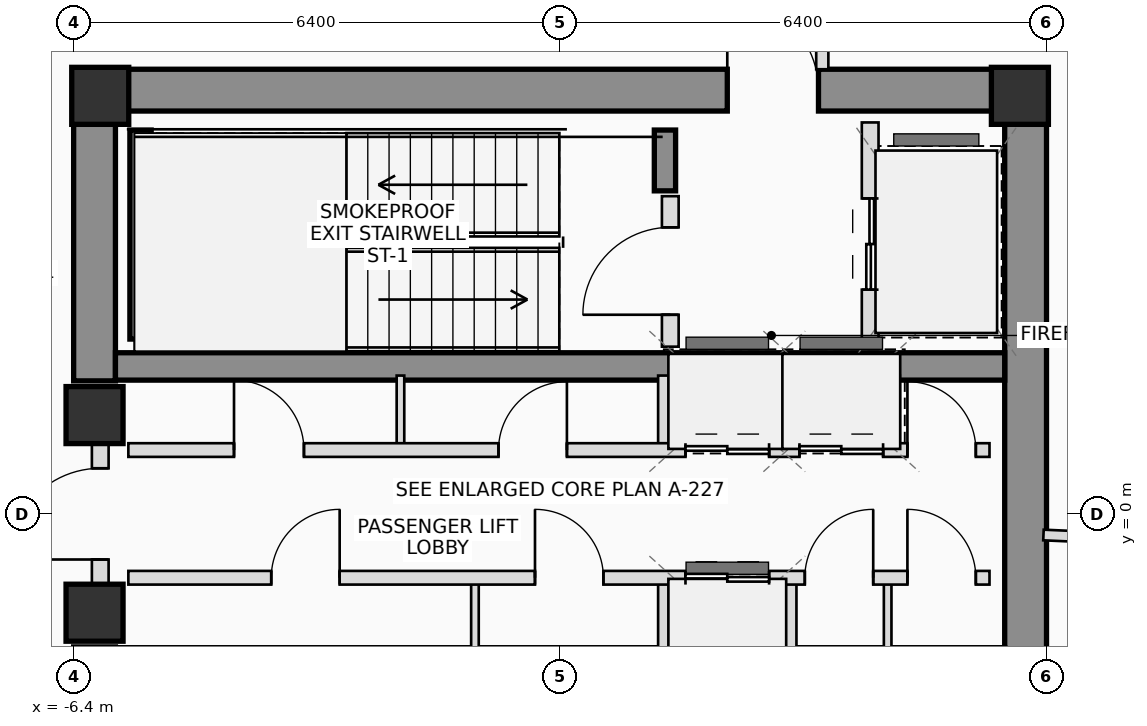
"""IFC4 building model, lengths in metres.
Left out: names, types, materials, properties, quantities, classifications, styles, units other than length and angle.
Written with IfcOpenShell. Run it as: python <this file> out.ifc"""

import sys

from ifc_helpers import new_model, si_unit, direction, frame, frame_2d, origin, origin_2d, place, context, subcontext, project, spatial, rectangle, extrude, source, transform, mapped, element, fill, save


model = new_model("IFC4")
c1 = context("Model", 3, precision=1e-05, world=origin(), true_north=direction((0.0, 1.0)))
c2 = subcontext(c1, "Body", "Model", "MODEL_VIEW")
j1 = project(units=[si_unit("LENGTHUNIT", "METRE"), si_unit("PLANEANGLEUNIT", "RADIAN")], contexts=[c1])
p1 = place(None, origin())
s1 = spatial("IfcSite", under=j1, at=p1, CompositionType="ELEMENT")
p2 = place(p1, origin())
s2 = spatial("IfcBuilding", under=s1, at=p2, CompositionType="ELEMENT")
p3 = place(p2, frame((0.0, 0.0, 293.3)))
s3 = spatial("IfcBuildingStorey", under=s2, at=p3, CompositionType="ELEMENT", Elevation=293.3)
m1 = source(origin(), c2, "Body", "SweptSolid", [
    extrude(rectangle(XDim=0.75, YDim=0.75, at=origin_2d()), origin(), (0.0, 0.0, 1.0), 3.45),
])
for number, where, z_axis, x_axis in (
    (1, (6.05, 5.5, 0.0), (0.0, 0.0, 1.0), (1.0, 0.0, 0.0)),
    (2, (-6.05, 5.5, 0.0), (0.0, 0.0, 1.0), (1.0, 0.0, 0.0)),
):
    element("IfcColumn", number, at=place(p3, frame(where, z_axis=z_axis, x_axis=x_axis)), inside=s3, PredefinedType="COLUMN", context=c2, shape_type="MappedRepresentation", body=[
        mapped(m1, transform((0.0, 0.0, 0.0), scale=1.0)),
    ])
p4 = place(p3, frame((-6.4, 5.575, 0.0), z_axis=(0.0, 0.0, 1.0), x_axis=(1.0, 0.0, 0.0)))
e3 = element("IfcWall", 3, at=p4, inside=s3, PredefinedType="SHEAR", context=c2, shape_type="SweptSolid", body=[
    extrude(rectangle(XDim=12.8, YDim=0.55, at=frame_2d((6.4, 0.0))), origin(), (0.0, 0.0, 1.0), 3.45),
])
p5 = place(p4, frame((8.6, 0.0, 0.0)))
e4 = element("IfcOpeningElement", 4, at=p5, cuts=e3, PredefinedType="OPENING", context=c2, shape_type="SweptSolid", body=[
    extrude(rectangle(XDim=1.2, YDim=2.2, at=frame_2d((0.6, 1.1))), frame((0.0, 0.285, 0.0), z_axis=(0.0, -1.0, 0.0), x_axis=(1.0, 0.0, 0.0)), (0.0, 0.0, 1.0), 0.57),
])
p6 = place(p3, frame((6.125, -5.3, 0.0), z_axis=(0.0, 0.0, 1.0), x_axis=(0.0, 1.0, 0.0)))
e5 = element("IfcWall", 5, at=p6, inside=s3, PredefinedType="SHEAR", context=c2, shape_type="SweptSolid", body=[
    extrude(rectangle(XDim=10.6, YDim=0.55, at=frame_2d((5.3, 0.0))), origin(), (0.0, 0.0, 1.0), 3.45),
])
p7 = place(p3, frame((-6.125, 1.75, 0.0), z_axis=(0.0, 0.0, 1.0), x_axis=(0.0, 1.0, 0.0)))
e6 = element("IfcWall", 6, at=p7, inside=s3, PredefinedType="SHEAR", context=c2, shape_type="SweptSolid", body=[
    extrude(rectangle(XDim=3.55, YDim=0.55, at=frame_2d((1.775, 0.0))), origin(), (0.0, 0.0, 1.0), 3.45),
])
p8 = place(p3, frame((-5.85, 1.94, 0.0), z_axis=(0.0, 0.0, 1.0), x_axis=(1.0, 0.0, 0.0)))
e7 = element("IfcWall", 7, at=p8, inside=s3, PredefinedType="SHEAR", context=c2, shape_type="SweptSolid", body=[
    extrude(rectangle(XDim=11.7, YDim=0.36, at=frame_2d((5.85, 0.0))), origin(), (0.0, 0.0, 1.0), 3.45),
])
p9 = place(p3, frame((-5.52, 2.3, 0.0), z_axis=(0.0, 0.0, 1.0), x_axis=(0.0, 1.0, 0.0)))
e8 = element("IfcWall", 8, at=p9, inside=s3, PredefinedType="SHEAR", context=c2, shape_type="SweptSolid", body=[
    extrude(rectangle(XDim=2.75, YDim=0.28, at=frame_2d((1.375, 0.0))), origin(), (0.0, 0.0, 1.0), 3.45),
])
p10 = place(p3, frame((1.38, 4.25, 0.0), z_axis=(0.0, 0.0, 1.0), x_axis=(0.0, 1.0, 0.0)))
e9 = element("IfcWall", 9, at=p10, inside=s3, PredefinedType="SHEAR", context=c2, shape_type="SweptSolid", body=[
    extrude(rectangle(XDim=0.8, YDim=0.28, at=frame_2d((0.4, 0.0))), origin(), (0.0, 0.0, 1.0), 3.45),
])
for number, where, z_axis, x_axis in (
    (10, (-6.125, -1.3, 0.0), (0.0, 0.0, 1.0), (1.0, 0.0, 0.0)),
    (11, (-6.125, 1.3, 0.0), (0.0, 0.0, 1.0), (1.0, 0.0, 0.0)),
):
    element("IfcColumn", number, at=place(p3, frame(where, z_axis=z_axis, x_axis=x_axis)), inside=s3, PredefinedType="COLUMN", context=c2, shape_type="MappedRepresentation", body=[
        mapped(m1, transform((0.0, 0.0, 0.0), scale=1.0)),
    ])
p11 = place(p3, frame((-6.05, -0.95, 0.0), z_axis=(0.0, 0.0, 1.0), x_axis=(0.0, 1.0, 0.0)))
e12 = element("IfcWall", 12, at=p11, inside=s3, PredefinedType="PLUMBINGWALL", context=c2, shape_type="SweptSolid", body=[
    extrude(rectangle(XDim=1.9, YDim=0.22, at=frame_2d((0.95, 0.0))), origin(), (0.0, 0.0, 1.0), 2.23),
])
p12 = place(p11, frame((0.35, 0.0, 0.0)))
e13 = element("IfcOpeningElement", 13, at=p12, cuts=e12, PredefinedType="OPENING", context=c2, shape_type="SweptSolid", body=[
    extrude(rectangle(XDim=1.2, YDim=2.2, at=frame_2d((0.6, 1.1))), frame((0.0, 0.12, 0.0), z_axis=(0.0, -1.0, 0.0), x_axis=(1.0, 0.0, 0.0)), (0.0, 0.0, 1.0), 0.24),
])
p13 = place(p3, frame((1.45, 2.2, 0.0), z_axis=(0.0, 0.0, 1.0), x_axis=(0.0, 1.0, 0.0)))
e14 = element("IfcWall", 14, at=p13, inside=s3, PredefinedType="PLUMBINGWALL", context=c2, shape_type="SweptSolid", body=[
    extrude(rectangle(XDim=1.98, YDim=0.22, at=frame_2d((0.99, 0.0))), origin(), (0.0, 0.0, 1.0), 3.25),
])
p14 = place(p13, frame((0.42, 0.0, 0.0)))
e15 = element("IfcOpeningElement", 15, at=p14, cuts=e14, PredefinedType="OPENING", context=c2, shape_type="SweptSolid", body=[
    extrude(rectangle(XDim=1.15, YDim=2.15, at=frame_2d((0.575, 1.075))), frame((0.0, 0.12, 0.0), z_axis=(0.0, -1.0, 0.0), x_axis=(1.0, 0.0, 0.0)), (0.0, 0.0, 1.0), 0.24),
])
p15 = place(p3, frame((4.08, 2.2, 0.0), z_axis=(0.0, 0.0, 1.0), x_axis=(0.0, 1.0, 0.0)))
e16 = element("IfcWall", 16, at=p15, inside=s3, PredefinedType="PLUMBINGWALL", context=c2, shape_type="SweptSolid", body=[
    extrude(rectangle(XDim=2.95, YDim=0.22, at=frame_2d((1.475, 0.0))), origin(), (0.0, 0.0, 1.0), 3.25),
])
p16 = place(p15, frame((0.75, 0.0, 0.0)))
e17 = element("IfcOpeningElement", 17, at=p16, cuts=e16, PredefinedType="OPENING", context=c2, shape_type="SweptSolid", body=[
    extrude(rectangle(XDim=1.2, YDim=2.25, at=frame_2d((0.6, 1.125))), frame((0.0, 0.12, 0.0), z_axis=(0.0, -1.0, 0.0), x_axis=(1.0, 0.0, 0.0)), (0.0, 0.0, 1.0), 0.24),
])
for number, where, z_axis, x_axis in (
    (18, (-2.1, 0.84, 0.0), (0.0, 0.0, 1.0), (0.0, 1.0, 0.0)),
    (19, (-1.12, -1.82, 0.0), (0.0, 0.0, 1.0), (0.0, 1.0, 0.0)),
):
    element("IfcWall", number, at=place(p3, frame(where, z_axis=z_axis, x_axis=x_axis)), inside=s3, PredefinedType="PARTITIONING", context=c2, shape_type="SweptSolid", body=[
        extrude(rectangle(XDim=0.98, YDim=0.1, at=frame_2d((0.49, 0.0))), origin(), (0.0, 0.0, 1.0), 3.25),
    ])
for number, where, z_axis, x_axis in (
    (20, (1.38, 0.84, 0.0), (0.0, 0.0, 1.0), (0.0, 1.0, 0.0)),
    (21, (1.38, -1.82, 0.0), (0.0, 0.0, 1.0), (0.0, 1.0, 0.0)),
    (22, (3.02, 0.84, 0.0), (0.0, 0.0, 1.0), (0.0, 1.0, 0.0)),
    (23, (4.38, 0.84, 0.0), (0.0, 0.0, 1.0), (0.0, 1.0, 0.0)),
    (24, (3.02, -1.82, 0.0), (0.0, 0.0, 1.0), (0.0, 1.0, 0.0)),
):
    element("IfcWall", number, at=place(p3, frame(where, z_axis=z_axis, x_axis=x_axis)), inside=s3, PredefinedType="PLUMBINGWALL", context=c2, shape_type="SweptSolid", body=[
        extrude(rectangle(XDim=0.98, YDim=0.18, at=frame_2d((0.49, 0.0))), origin(), (0.0, 0.0, 1.0), 3.25),
    ])
p17 = place(p3, frame((4.31, -1.82, 0.0), z_axis=(0.0, 0.0, 1.0), x_axis=(0.0, 1.0, 0.0)))
e25 = element("IfcWall", 25, at=p17, inside=s3, PredefinedType="PARTITIONING", context=c2, shape_type="SweptSolid", body=[
    extrude(rectangle(XDim=0.98, YDim=0.1, at=frame_2d((0.49, 0.0))), origin(), (0.0, 0.0, 1.0), 3.25),
])
p18 = place(p3, frame((-5.68, 0.84, 0.0), z_axis=(0.0, 0.0, 1.0), x_axis=(1.0, 0.0, 0.0)))
e26 = element("IfcWall", 26, at=p18, inside=s3, PredefinedType="PLUMBINGWALL", context=c2, shape_type="SweptSolid", body=[
    extrude(rectangle(XDim=11.33, YDim=0.18, at=frame_2d((5.665, 0.0))), origin(), (0.0, 0.0, 1.0), 3.25),
])
p19 = place(p18, frame((1.39, 0.0, 0.0)))
e27 = element("IfcOpeningElement", 27, at=p19, cuts=e26, PredefinedType="OPENING", context=c2, shape_type="SweptSolid", body=[
    extrude(rectangle(XDim=0.92, YDim=2.1, at=frame_2d((0.46, 1.05))), frame((0.0, 0.1, 0.0), z_axis=(0.0, -1.0, 0.0), x_axis=(1.0, 0.0, 0.0)), (0.0, 0.0, 1.0), 0.2),
])
p20 = place(p18, frame((4.87, 0.0, 0.0)))
e28 = element("IfcOpeningElement", 28, at=p20, cuts=e26, PredefinedType="OPENING", context=c2, shape_type="SweptSolid", body=[
    extrude(rectangle(XDim=0.9, YDim=2.05, at=frame_2d((0.45, 1.025))), frame((0.0, 0.1, 0.0), z_axis=(0.0, -1.0, 0.0), x_axis=(1.0, 0.0, 0.0)), (0.0, 0.0, 1.0), 0.2),
])
p21 = place(p18, frame((7.33, 0.0, 0.0)))
e29 = element("IfcOpeningElement", 29, at=p21, cuts=e26, PredefinedType="OPENING", context=c2, shape_type="SweptSolid", body=[
    extrude(rectangle(XDim=1.1, YDim=2.2, at=frame_2d((0.55, 1.1))), frame((0.0, 0.1, 0.0), z_axis=(0.0, -1.0, 0.0), x_axis=(1.0, 0.0, 0.0)), (0.0, 0.0, 1.0), 0.2),
])
p22 = place(p18, frame((8.83, 0.0, 0.0)))
e30 = element("IfcOpeningElement", 30, at=p22, cuts=e26, PredefinedType="OPENING", context=c2, shape_type="SweptSolid", body=[
    extrude(rectangle(XDim=1.1, YDim=2.2, at=frame_2d((0.55, 1.1))), frame((0.0, 0.1, 0.0), z_axis=(0.0, -1.0, 0.0), x_axis=(1.0, 0.0, 0.0)), (0.0, 0.0, 1.0), 0.2),
])
p23 = place(p18, frame((10.25, 0.0, 0.0)))
e31 = element("IfcOpeningElement", 31, at=p23, cuts=e26, PredefinedType="OPENING", context=c2, shape_type="SweptSolid", body=[
    extrude(rectangle(XDim=0.9, YDim=2.05, at=frame_2d((0.45, 1.025))), frame((0.0, 0.1, 0.0), z_axis=(0.0, -1.0, 0.0), x_axis=(1.0, 0.0, 0.0)), (0.0, 0.0, 1.0), 0.2),
])
p24 = place(p3, frame((-5.68, -0.84, 0.0), z_axis=(0.0, 0.0, 1.0), x_axis=(1.0, 0.0, 0.0)))
e32 = element("IfcWall", 32, at=p24, inside=s3, PredefinedType="PLUMBINGWALL", context=c2, shape_type="SweptSolid", body=[
    extrude(rectangle(XDim=11.33, YDim=0.18, at=frame_2d((5.665, 0.0))), origin(), (0.0, 0.0, 1.0), 3.25),
])
p25 = place(p24, frame((1.88, 0.0, 0.0)))
e33 = element("IfcOpeningElement", 33, at=p25, cuts=e32, PredefinedType="OPENING", context=c2, shape_type="SweptSolid", body=[
    extrude(rectangle(XDim=0.9, YDim=2.05, at=frame_2d((0.45, 1.025))), frame((0.0, 0.1, 0.0), z_axis=(0.0, -1.0, 0.0), x_axis=(1.0, 0.0, 0.0)), (0.0, 0.0, 1.0), 0.2),
])
p26 = place(p24, frame((5.35, 0.0, 0.0)))
e34 = element("IfcOpeningElement", 34, at=p26, cuts=e32, PredefinedType="OPENING", context=c2, shape_type="SweptSolid", body=[
    extrude(rectangle(XDim=0.9, YDim=2.05, at=frame_2d((0.45, 1.025))), frame((0.0, 0.1, 0.0), z_axis=(0.0, -1.0, 0.0), x_axis=(1.0, 0.0, 0.0)), (0.0, 0.0, 1.0), 0.2),
])
p27 = place(p24, frame((7.33, 0.0, 0.0)))
e35 = element("IfcOpeningElement", 35, at=p27, cuts=e32, PredefinedType="OPENING", context=c2, shape_type="SweptSolid", body=[
    extrude(rectangle(XDim=1.1, YDim=2.2, at=frame_2d((0.55, 1.1))), frame((0.0, 0.1, 0.0), z_axis=(0.0, -1.0, 0.0), x_axis=(1.0, 0.0, 0.0)), (0.0, 0.0, 1.0), 0.2),
])
p28 = place(p24, frame((8.9, 0.0, 0.0)))
e36 = element("IfcOpeningElement", 36, at=p28, cuts=e32, PredefinedType="OPENING", context=c2, shape_type="SweptSolid", body=[
    extrude(rectangle(XDim=0.9, YDim=2.05, at=frame_2d((0.45, 1.025))), frame((0.0, 0.1, 0.0), z_axis=(0.0, -1.0, 0.0), x_axis=(1.0, 0.0, 0.0)), (0.0, 0.0, 1.0), 0.2),
])
p29 = place(p24, frame((10.25, 0.0, 0.0)))
e37 = element("IfcOpeningElement", 37, at=p29, cuts=e32, PredefinedType="OPENING", context=c2, shape_type="SweptSolid", body=[
    extrude(rectangle(XDim=0.9, YDim=2.05, at=frame_2d((0.45, 1.025))), frame((0.0, 0.1, 0.0), z_axis=(0.0, -1.0, 0.0), x_axis=(1.0, 0.0, 0.0)), (0.0, 0.0, 1.0), 0.2),
])
p30 = place(p3, frame((3.45, 7.425, 0.0), z_axis=(0.0, 0.0, 1.0), x_axis=(0.0, -1.0, 0.0)))
e38 = element("IfcWall", 38, at=p30, inside=s3, PredefinedType="PARTITIONING", context=c2, shape_type="SweptSolid", body=[
    extrude(rectangle(XDim=1.575, YDim=0.16, at=frame_2d((0.787, 0.0))), origin(), (0.0, 0.0, 1.0), 2.855),
])
p31 = place(p30, frame((0.287, 0.0, 0.0)))
e39 = element("IfcOpeningElement", 39, at=p31, cuts=e38, PredefinedType="OPENING", context=c2, shape_type="SweptSolid", body=[
    extrude(rectangle(XDim=1.0, YDim=2.25, at=frame_2d((0.5, 1.125))), frame((0.0, 0.09, 0.0), z_axis=(0.0, -1.0, 0.0), x_axis=(1.0, 0.0, 0.0)), (0.0, 0.0, 1.0), 0.18),
])
p32 = place(p3, frame((6.36, -0.278, 0.0), z_axis=(0.0, 0.0, 1.0), x_axis=(0.999047623791, -0.043633076864, 0.0)))
e40 = element("IfcWall", 40, at=p32, inside=s3, PredefinedType="PARTITIONING", context=c2, shape_type="SweptSolid", body=[
    extrude(rectangle(XDim=13.524, YDim=0.14, at=frame_2d((6.762, 0.0))), origin(), (0.0, 0.0, 1.0), 2.815),
])
p33 = place(p5, origin())
e41 = element("IfcDoor", 41, at=p33, inside=s3, OperationType="SINGLE_SWING_LEFT", PredefinedType="DOOR", context=c2, shape_type="SweptSolid", body=[
    extrude(rectangle(XDim=1.2, YDim=2.2, at=frame_2d((0.6, 1.1))), frame((0.0, 0.025, 0.0), z_axis=(0.0, -1.0, 0.0), x_axis=(1.0, 0.0, 0.0)), (0.0, 0.0, 1.0), 0.05),
])
fill(e4, e41)
p34 = place(p12, origin())
e42 = element("IfcDoor", 42, at=p34, inside=s3, OperationType="SINGLE_SWING_LEFT", PredefinedType="DOOR", context=c2, shape_type="SweptSolid", body=[
    extrude(rectangle(XDim=1.2, YDim=2.2, at=frame_2d((0.6, 1.1))), frame((0.0, 0.025, 0.0), z_axis=(0.0, -1.0, 0.0), x_axis=(1.0, 0.0, 0.0)), (0.0, 0.0, 1.0), 0.05),
])
fill(e13, e42)
p35 = place(p14, origin())
e43 = element("IfcDoor", 43, at=p35, inside=s3, OperationType="SINGLE_SWING_LEFT", PredefinedType="DOOR", context=c2, shape_type="SweptSolid", body=[
    extrude(rectangle(XDim=1.15, YDim=2.15, at=frame_2d((0.575, 1.075))), frame((0.0, 0.025, 0.0), z_axis=(0.0, -1.0, 0.0), x_axis=(1.0, 0.0, 0.0)), (0.0, 0.0, 1.0), 0.05),
])
fill(e15, e43)
p36 = place(p16, origin())
e44 = element("IfcDoor", 44, at=p36, inside=s3, OperationType="DOUBLE_DOOR_SLIDING", PredefinedType="DOOR", context=c2, shape_type="SweptSolid", body=[
    extrude(rectangle(XDim=1.2, YDim=2.25, at=frame_2d((0.6, 1.125))), frame((0.0, 0.025, 0.0), z_axis=(0.0, -1.0, 0.0), x_axis=(1.0, 0.0, 0.0)), (0.0, 0.0, 1.0), 0.05),
])
fill(e17, e44)
p37 = place(p19, origin())
e45 = element("IfcDoor", 45, at=p37, inside=s3, OperationType="SINGLE_SWING_LEFT", PredefinedType="DOOR", context=c2, shape_type="SweptSolid", body=[
    extrude(rectangle(XDim=0.92, YDim=2.1, at=frame_2d((0.46, 1.05))), frame((0.0, 0.025, 0.0), z_axis=(0.0, -1.0, 0.0), x_axis=(1.0, 0.0, 0.0)), (0.0, 0.0, 1.0), 0.05),
])
fill(e27, e45)
p38 = place(p20, origin())
e46 = element("IfcDoor", 46, at=p38, inside=s3, OperationType="SINGLE_SWING_RIGHT", PredefinedType="DOOR", context=c2, shape_type="SweptSolid", body=[
    extrude(rectangle(XDim=0.9, YDim=2.05, at=frame_2d((0.45, 1.025))), frame((0.0, 0.025, 0.0), z_axis=(0.0, -1.0, 0.0), x_axis=(1.0, 0.0, 0.0)), (0.0, 0.0, 1.0), 0.05),
])
fill(e28, e46)
p39 = place(p21, origin())
e47 = element("IfcDoor", 47, at=p39, inside=s3, OperationType="DOUBLE_DOOR_SLIDING", PredefinedType="DOOR", context=c2, shape_type="SweptSolid", body=[
    extrude(rectangle(XDim=1.1, YDim=2.2, at=frame_2d((0.55, 1.1))), frame((0.0, 0.025, 0.0), z_axis=(0.0, -1.0, 0.0), x_axis=(1.0, 0.0, 0.0)), (0.0, 0.0, 1.0), 0.05),
])
fill(e29, e47)
p40 = place(p22, origin())
e48 = element("IfcDoor", 48, at=p40, inside=s3, OperationType="DOUBLE_DOOR_SLIDING", PredefinedType="DOOR", context=c2, shape_type="SweptSolid", body=[
    extrude(rectangle(XDim=1.1, YDim=2.2, at=frame_2d((0.55, 1.1))), frame((0.0, 0.025, 0.0), z_axis=(0.0, -1.0, 0.0), x_axis=(1.0, 0.0, 0.0)), (0.0, 0.0, 1.0), 0.05),
])
fill(e30, e48)
p41 = place(p23, origin())
e49 = element("IfcDoor", 49, at=p41, inside=s3, OperationType="SINGLE_SWING_LEFT", PredefinedType="DOOR", context=c2, shape_type="SweptSolid", body=[
    extrude(rectangle(XDim=0.9, YDim=2.05, at=frame_2d((0.45, 1.025))), frame((0.0, 0.025, 0.0), z_axis=(0.0, -1.0, 0.0), x_axis=(1.0, 0.0, 0.0)), (0.0, 0.0, 1.0), 0.05),
])
fill(e31, e49)
p42 = place(p25, origin())
e50 = element("IfcDoor", 50, at=p42, inside=s3, OperationType="SINGLE_SWING_RIGHT", PredefinedType="DOOR", context=c2, shape_type="SweptSolid", body=[
    extrude(rectangle(XDim=0.9, YDim=2.05, at=frame_2d((0.45, 1.025))), frame((0.0, 0.025, 0.0), z_axis=(0.0, -1.0, 0.0), x_axis=(1.0, 0.0, 0.0)), (0.0, 0.0, 1.0), 0.05),
])
fill(e33, e50)
p43 = place(p26, origin())
e51 = element("IfcDoor", 51, at=p43, inside=s3, OperationType="SINGLE_SWING_LEFT", PredefinedType="DOOR", context=c2, shape_type="SweptSolid", body=[
    extrude(rectangle(XDim=0.9, YDim=2.05, at=frame_2d((0.45, 1.025))), frame((0.0, 0.025, 0.0), z_axis=(0.0, -1.0, 0.0), x_axis=(1.0, 0.0, 0.0)), (0.0, 0.0, 1.0), 0.05),
])
fill(e34, e51)
p44 = place(p27, origin())
e52 = element("IfcDoor", 52, at=p44, inside=s3, OperationType="DOUBLE_DOOR_SLIDING", PredefinedType="DOOR", context=c2, shape_type="SweptSolid", body=[
    extrude(rectangle(XDim=1.1, YDim=2.2, at=frame_2d((0.55, 1.1))), frame((0.0, 0.025, 0.0), z_axis=(0.0, -1.0, 0.0), x_axis=(1.0, 0.0, 0.0)), (0.0, 0.0, 1.0), 0.05),
])
fill(e35, e52)
p45 = place(p28, origin())
e53 = element("IfcDoor", 53, at=p45, inside=s3, OperationType="SINGLE_SWING_RIGHT", PredefinedType="DOOR", context=c2, shape_type="SweptSolid", body=[
    extrude(rectangle(XDim=0.9, YDim=2.05, at=frame_2d((0.45, 1.025))), frame((0.0, 0.025, 0.0), z_axis=(0.0, -1.0, 0.0), x_axis=(1.0, 0.0, 0.0)), (0.0, 0.0, 1.0), 0.05),
])
fill(e36, e53)
p46 = place(p29, origin())
e54 = element("IfcDoor", 54, at=p46, inside=s3, OperationType="SINGLE_SWING_LEFT", PredefinedType="DOOR", context=c2, shape_type="SweptSolid", body=[
    extrude(rectangle(XDim=0.9, YDim=2.05, at=frame_2d((0.45, 1.025))), frame((0.0, 0.025, 0.0), z_axis=(0.0, -1.0, 0.0), x_axis=(1.0, 0.0, 0.0)), (0.0, 0.0, 1.0), 0.05),
])
fill(e37, e54)
save(model, sys.argv[1])
